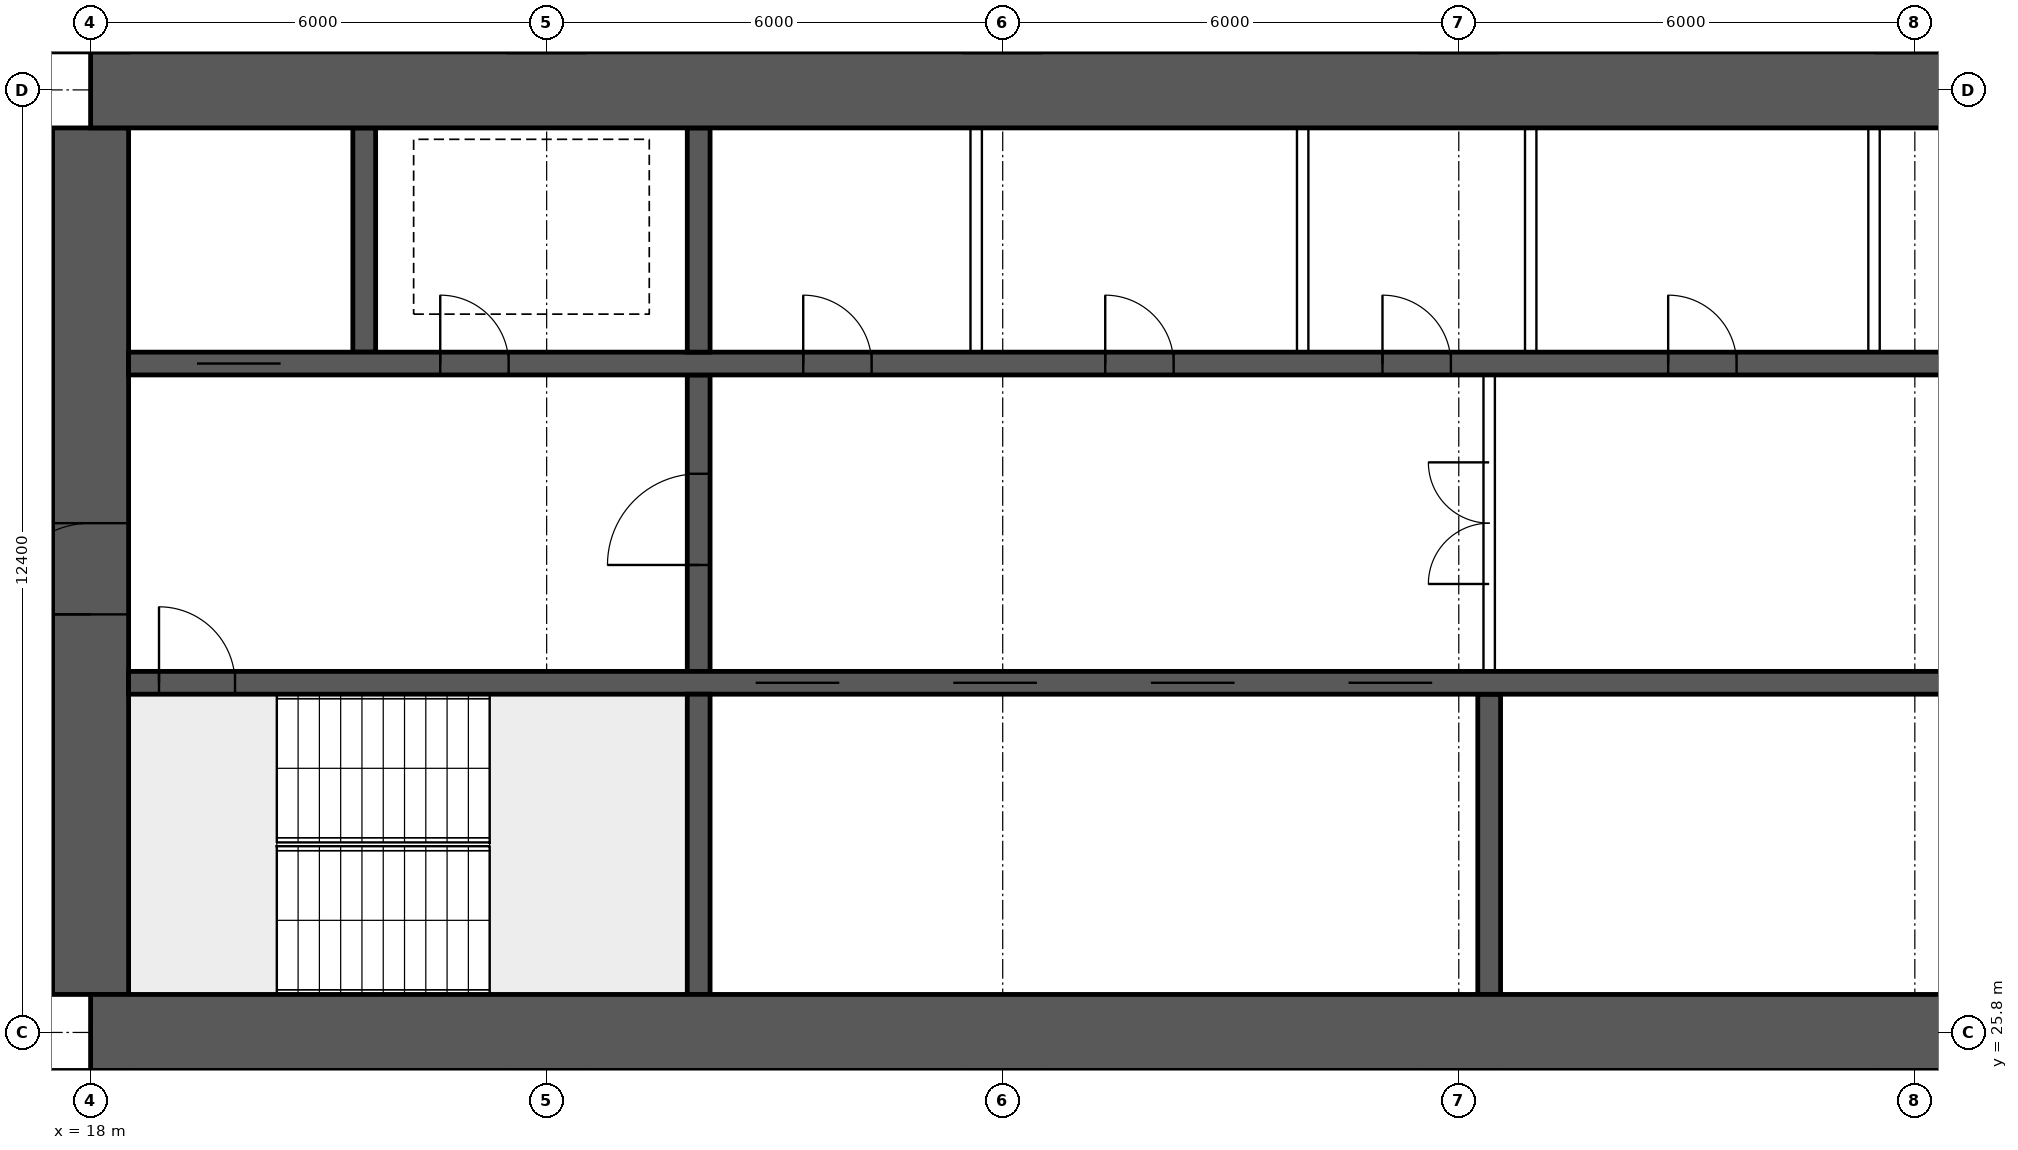
"""IFC4 building model, lengths in metres.
Left out: names, types, materials, properties, quantities, classifications, styles, units other than length and angle.
Written with IfcOpenShell. Run it as: python <this file> out.ifc"""

import sys

from ifc_helpers import new_model, si_unit, direction, frame, frame_2d, origin, place, context, subcontext, project, spatial, rectangle, extrude, element, fill, save


model = new_model("IFC4")
c1 = context("Model", 3, precision=1e-05, world=origin(), true_north=direction((0.0, 1.0)))
c2 = subcontext(c1, "Body", "Model", "MODEL_VIEW")
j1 = project(units=[si_unit("LENGTHUNIT", "METRE"), si_unit("PLANEANGLEUNIT", "RADIAN")], contexts=[c1])
p1 = place(None, origin())
s1 = spatial("IfcSite", under=j1, at=p1, CompositionType="ELEMENT")
p2 = place(p1, origin())
s2 = spatial("IfcBuilding", under=s1, at=p2, CompositionType="ELEMENT")
p3 = place(p2, frame((0.0, 0.0, 46.45)))
s3 = spatial("IfcBuildingStorey", under=s2, at=p3, CompositionType="ELEMENT", Elevation=46.45)
for number, where, z_axis, x_axis in (
    (1, (18.0, 25.8, 0.0), (0.0, 0.0, 1.0), (1.0, 0.0, 0.0)),
    (2, (18.0, 38.2, 0.0), (0.0, 0.0, 1.0), (1.0, 0.0, 0.0)),
):
    element("IfcWall", number, at=place(p3, frame(where, z_axis=z_axis, x_axis=x_axis)), inside=s3, PredefinedType="SHEAR", context=c2, shape_type="SweptSolid", body=[
        extrude(rectangle(XDim=48.0, YDim=1.0, at=frame_2d((24.0, 0.0))), origin(), (0.0, 0.0, 1.0), 3.75),
    ])
p4 = place(p3, frame((18.0, 26.3, 0.0), z_axis=(0.0, 0.0, 1.0), x_axis=(0.0, 1.0, 0.0)))
e3 = element("IfcWall", 3, at=p4, inside=s3, PredefinedType="SHEAR", context=c2, shape_type="SweptSolid", body=[
    extrude(rectangle(XDim=11.4, YDim=1.0, at=frame_2d((5.7, 0.0))), origin(), (0.0, 0.0, 1.0), 3.75),
])
p5 = place(p4, frame((5.0, 0.0, 0.0)))
e4 = element("IfcOpeningElement", 4, at=p5, cuts=e3, PredefinedType="OPENING", context=c2, shape_type="SweptSolid", body=[
    extrude(rectangle(XDim=1.2, YDim=2.1, at=frame_2d((0.6, 1.05))), frame((0.0, 0.51, 0.0), z_axis=(0.0, -1.0, 0.0), x_axis=(1.0, 0.0, 0.0)), (0.0, 0.0, 1.0), 1.02),
])
p6 = place(p3, frame((18.5, 30.4, 0.0), z_axis=(0.0, 0.0, 1.0), x_axis=(1.0, 0.0, 0.0)))
e5 = element("IfcWall", 5, at=p6, inside=s3, PredefinedType="SHEAR", context=c2, shape_type="SweptSolid", body=[
    extrude(rectangle(XDim=47.0, YDim=0.3, at=frame_2d((23.5, 0.0))), origin(), (0.0, 0.0, 1.0), 3.75),
])
p7 = place(p6, frame((0.4, 0.0, 0.0)))
e6 = element("IfcOpeningElement", 6, at=p7, cuts=e5, PredefinedType="OPENING", context=c2, shape_type="SweptSolid", body=[
    extrude(rectangle(XDim=1.0, YDim=2.1, at=frame_2d((0.5, 1.05))), frame((0.0, 0.16, 0.0), z_axis=(0.0, -1.0, 0.0), x_axis=(1.0, 0.0, 0.0)), (0.0, 0.0, 1.0), 0.32),
])
p8 = place(p6, frame((45.6, 0.0, 0.0)))
e7 = element("IfcOpeningElement", 7, at=p8, cuts=e5, PredefinedType="OPENING", context=c2, shape_type="SweptSolid", body=[
    extrude(rectangle(XDim=1.0, YDim=2.1, at=frame_2d((0.5, 1.05))), frame((0.0, 0.16, 0.0), z_axis=(0.0, -1.0, 0.0), x_axis=(1.0, 0.0, 0.0)), (0.0, 0.0, 1.0), 0.32),
])
p9 = place(p6, frame((8.25, 0.0, 0.0)))
e8 = element("IfcOpeningElement", 8, at=p9, cuts=e5, PredefinedType="OPENING", context=c2, shape_type="SweptSolid", body=[
    extrude(rectangle(XDim=1.1, YDim=2.1, at=frame_2d((0.55, 1.05))), frame((0.0, 0.16, 0.0), z_axis=(0.0, -1.0, 0.0), x_axis=(1.0, 0.0, 0.0)), (0.0, 0.0, 1.0), 0.32),
])
p10 = place(p6, frame((10.85, 0.0, 0.0)))
e9 = element("IfcOpeningElement", 9, at=p10, cuts=e5, PredefinedType="OPENING", context=c2, shape_type="SweptSolid", body=[
    extrude(rectangle(XDim=1.1, YDim=2.1, at=frame_2d((0.55, 1.05))), frame((0.0, 0.16, 0.0), z_axis=(0.0, -1.0, 0.0), x_axis=(1.0, 0.0, 0.0)), (0.0, 0.0, 1.0), 0.32),
])
p11 = place(p6, frame((13.45, 0.0, 0.0)))
e10 = element("IfcOpeningElement", 10, at=p11, cuts=e5, PredefinedType="OPENING", context=c2, shape_type="SweptSolid", body=[
    extrude(rectangle(XDim=1.1, YDim=2.1, at=frame_2d((0.55, 1.05))), frame((0.0, 0.16, 0.0), z_axis=(0.0, -1.0, 0.0), x_axis=(1.0, 0.0, 0.0)), (0.0, 0.0, 1.0), 0.32),
])
p12 = place(p6, frame((16.05, 0.0, 0.0)))
e11 = element("IfcOpeningElement", 11, at=p12, cuts=e5, PredefinedType="OPENING", context=c2, shape_type="SweptSolid", body=[
    extrude(rectangle(XDim=1.1, YDim=2.1, at=frame_2d((0.55, 1.05))), frame((0.0, 0.16, 0.0), z_axis=(0.0, -1.0, 0.0), x_axis=(1.0, 0.0, 0.0)), (0.0, 0.0, 1.0), 0.32),
])
p13 = place(p6, frame((30.117, 0.0, 0.0)))
e12 = element("IfcOpeningElement", 12, at=p13, cuts=e5, PredefinedType="OPENING", context=c2, shape_type="SweptSolid", body=[
    extrude(rectangle(XDim=1.1, YDim=2.1, at=frame_2d((0.55, 1.05))), frame((0.0, 0.16, 0.0), z_axis=(0.0, -1.0, 0.0), x_axis=(1.0, 0.0, 0.0)), (0.0, 0.0, 1.0), 0.32),
])
p14 = place(p6, frame((33.65, 0.0, 0.0)))
e13 = element("IfcOpeningElement", 13, at=p14, cuts=e5, PredefinedType="OPENING", context=c2, shape_type="SweptSolid", body=[
    extrude(rectangle(XDim=1.1, YDim=2.1, at=frame_2d((0.55, 1.05))), frame((0.0, 0.16, 0.0), z_axis=(0.0, -1.0, 0.0), x_axis=(1.0, 0.0, 0.0)), (0.0, 0.0, 1.0), 0.32),
])
p15 = place(p6, frame((37.183, 0.0, 0.0)))
e14 = element("IfcOpeningElement", 14, at=p15, cuts=e5, PredefinedType="OPENING", context=c2, shape_type="SweptSolid", body=[
    extrude(rectangle(XDim=1.1, YDim=2.1, at=frame_2d((0.55, 1.05))), frame((0.0, 0.16, 0.0), z_axis=(0.0, -1.0, 0.0), x_axis=(1.0, 0.0, 0.0)), (0.0, 0.0, 1.0), 0.32),
])
p16 = place(p3, frame((18.5, 34.6, 0.0), z_axis=(0.0, 0.0, 1.0), x_axis=(1.0, 0.0, 0.0)))
e15 = element("IfcWall", 15, at=p16, inside=s3, PredefinedType="SHEAR", context=c2, shape_type="SweptSolid", body=[
    extrude(rectangle(XDim=47.0, YDim=0.3, at=frame_2d((23.5, 0.0))), origin(), (0.0, 0.0, 1.0), 3.75),
])
p17 = place(p16, frame((0.9, 0.0, 0.0)))
e16 = element("IfcOpeningElement", 16, at=p17, cuts=e15, PredefinedType="OPENING", context=c2, shape_type="SweptSolid", body=[
    extrude(rectangle(XDim=1.1, YDim=2.1, at=frame_2d((0.55, 1.05))), frame((0.0, 0.16, 0.0), z_axis=(0.0, -1.0, 0.0), x_axis=(1.0, 0.0, 0.0)), (0.0, 0.0, 1.0), 0.32),
])
p18 = place(p16, frame((45.0, 0.0, 0.0)))
e17 = element("IfcOpeningElement", 17, at=p18, cuts=e15, PredefinedType="OPENING", context=c2, shape_type="SweptSolid", body=[
    extrude(rectangle(XDim=1.1, YDim=2.1, at=frame_2d((0.55, 1.05))), frame((0.0, 0.16, 0.0), z_axis=(0.0, -1.0, 0.0), x_axis=(1.0, 0.0, 0.0)), (0.0, 0.0, 1.0), 0.32),
])
p19 = place(p16, frame((4.1, 0.0, 0.0)))
e18 = element("IfcOpeningElement", 18, at=p19, cuts=e15, PredefinedType="OPENING", context=c2, shape_type="SweptSolid", body=[
    extrude(rectangle(XDim=0.9, YDim=2.1, at=frame_2d((0.45, 1.05))), frame((0.0, 0.16, 0.0), z_axis=(0.0, -1.0, 0.0), x_axis=(1.0, 0.0, 0.0)), (0.0, 0.0, 1.0), 0.32),
])
p20 = place(p16, frame((42.0, 0.0, 0.0)))
e19 = element("IfcOpeningElement", 19, at=p20, cuts=e15, PredefinedType="OPENING", context=c2, shape_type="SweptSolid", body=[
    extrude(rectangle(XDim=0.9, YDim=2.1, at=frame_2d((0.45, 1.05))), frame((0.0, 0.16, 0.0), z_axis=(0.0, -1.0, 0.0), x_axis=(1.0, 0.0, 0.0)), (0.0, 0.0, 1.0), 0.32),
])
p21 = place(p16, frame((8.875, 0.0, 0.0)))
e20 = element("IfcOpeningElement", 20, at=p21, cuts=e15, PredefinedType="OPENING", context=c2, shape_type="SweptSolid", body=[
    extrude(rectangle(XDim=0.9, YDim=2.1, at=frame_2d((0.45, 1.05))), frame((0.0, 0.16, 0.0), z_axis=(0.0, -1.0, 0.0), x_axis=(1.0, 0.0, 0.0)), (0.0, 0.0, 1.0), 0.32),
])
p22 = place(p16, frame((12.849, 0.0, 0.0)))
e21 = element("IfcOpeningElement", 21, at=p22, cuts=e15, PredefinedType="OPENING", context=c2, shape_type="SweptSolid", body=[
    extrude(rectangle(XDim=0.9, YDim=2.1, at=frame_2d((0.45, 1.05))), frame((0.0, 0.16, 0.0), z_axis=(0.0, -1.0, 0.0), x_axis=(1.0, 0.0, 0.0)), (0.0, 0.0, 1.0), 0.32),
])
p23 = place(p16, frame((16.496, 0.0, 0.0)))
e22 = element("IfcOpeningElement", 22, at=p23, cuts=e15, PredefinedType="OPENING", context=c2, shape_type="SweptSolid", body=[
    extrude(rectangle(XDim=0.9, YDim=2.1, at=frame_2d((0.45, 1.05))), frame((0.0, 0.16, 0.0), z_axis=(0.0, -1.0, 0.0), x_axis=(1.0, 0.0, 0.0)), (0.0, 0.0, 1.0), 0.32),
])
p24 = place(p16, frame((20.255, 0.0, 0.0)))
e23 = element("IfcOpeningElement", 23, at=p24, cuts=e15, PredefinedType="OPENING", context=c2, shape_type="SweptSolid", body=[
    extrude(rectangle(XDim=0.9, YDim=2.1, at=frame_2d((0.45, 1.05))), frame((0.0, 0.16, 0.0), z_axis=(0.0, -1.0, 0.0), x_axis=(1.0, 0.0, 0.0)), (0.0, 0.0, 1.0), 0.32),
])
p25 = place(p16, frame((24.661, 0.0, 0.0)))
e24 = element("IfcOpeningElement", 24, at=p25, cuts=e15, PredefinedType="OPENING", context=c2, shape_type="SweptSolid", body=[
    extrude(rectangle(XDim=0.9, YDim=2.1, at=frame_2d((0.45, 1.05))), frame((0.0, 0.16, 0.0), z_axis=(0.0, -1.0, 0.0), x_axis=(1.0, 0.0, 0.0)), (0.0, 0.0, 1.0), 0.32),
])
p26 = place(p16, frame((27.458, 0.0, 0.0)))
e25 = element("IfcOpeningElement", 25, at=p26, cuts=e15, PredefinedType="OPENING", context=c2, shape_type="SweptSolid", body=[
    extrude(rectangle(XDim=0.9, YDim=2.1, at=frame_2d((0.45, 1.05))), frame((0.0, 0.16, 0.0), z_axis=(0.0, -1.0, 0.0), x_axis=(1.0, 0.0, 0.0)), (0.0, 0.0, 1.0), 0.32),
])
p27 = place(p16, frame((30.641, 0.0, 0.0)))
e26 = element("IfcOpeningElement", 26, at=p27, cuts=e15, PredefinedType="OPENING", context=c2, shape_type="SweptSolid", body=[
    extrude(rectangle(XDim=0.9, YDim=2.1, at=frame_2d((0.45, 1.05))), frame((0.0, 0.16, 0.0), z_axis=(0.0, -1.0, 0.0), x_axis=(1.0, 0.0, 0.0)), (0.0, 0.0, 1.0), 0.32),
])
p28 = place(p16, frame((34.592, 0.0, 0.0)))
e27 = element("IfcOpeningElement", 27, at=p28, cuts=e15, PredefinedType="OPENING", context=c2, shape_type="SweptSolid", body=[
    extrude(rectangle(XDim=0.9, YDim=2.1, at=frame_2d((0.45, 1.05))), frame((0.0, 0.16, 0.0), z_axis=(0.0, -1.0, 0.0), x_axis=(1.0, 0.0, 0.0)), (0.0, 0.0, 1.0), 0.32),
])
p29 = place(p16, frame((37.53, 0.0, 0.0)))
e28 = element("IfcOpeningElement", 28, at=p29, cuts=e15, PredefinedType="OPENING", context=c2, shape_type="SweptSolid", body=[
    extrude(rectangle(XDim=0.9, YDim=2.1, at=frame_2d((0.45, 1.05))), frame((0.0, 0.16, 0.0), z_axis=(0.0, -1.0, 0.0), x_axis=(1.0, 0.0, 0.0)), (0.0, 0.0, 1.0), 0.32),
])
p30 = place(p3, frame((26.0, 26.3, 0.0), z_axis=(0.0, 0.0, 1.0), x_axis=(0.0, 1.0, 0.0)))
e29 = element("IfcWall", 29, at=p30, inside=s3, PredefinedType="SHEAR", context=c2, shape_type="SweptSolid", body=[
    extrude(rectangle(XDim=3.95, YDim=0.3, at=frame_2d((1.975, 0.0))), origin(), (0.0, 0.0, 1.0), 3.75),
])
p31 = place(p3, frame((26.0, 30.55, 0.0), z_axis=(0.0, 0.0, 1.0), x_axis=(0.0, 1.0, 0.0)))
e30 = element("IfcWall", 30, at=p31, inside=s3, PredefinedType="SHEAR", context=c2, shape_type="SweptSolid", body=[
    extrude(rectangle(XDim=3.9, YDim=0.3, at=frame_2d((1.95, 0.0))), origin(), (0.0, 0.0, 1.0), 3.75),
])
p32 = place(p31, frame((1.4, 0.0, 0.0)))
e31 = element("IfcOpeningElement", 31, at=p32, cuts=e30, PredefinedType="OPENING", context=c2, shape_type="SweptSolid", body=[
    extrude(rectangle(XDim=1.2, YDim=2.1, at=frame_2d((0.6, 1.05))), frame((0.0, 0.16, 0.0), z_axis=(0.0, -1.0, 0.0), x_axis=(1.0, 0.0, 0.0)), (0.0, 0.0, 1.0), 0.32),
])
for number, where, z_axis, x_axis in (
    (32, (21.6, 34.75, 0.0), (0.0, 0.0, 1.0), (0.0, 1.0, 0.0)),
    (33, (26.0, 34.75, 0.0), (0.0, 0.0, 1.0), (0.0, 1.0, 0.0)),
):
    element("IfcWall", number, at=place(p3, frame(where, z_axis=z_axis, x_axis=x_axis)), inside=s3, PredefinedType="SHEAR", context=c2, shape_type="SweptSolid", body=[
        extrude(rectangle(XDim=2.95, YDim=0.3, at=frame_2d((1.475, 0.0))), origin(), (0.0, 0.0, 1.0), 3.75),
    ])
p33 = place(p3, frame((36.4, 26.3, 0.0), z_axis=(0.0, 0.0, 1.0), x_axis=(0.0, 1.0, 0.0)))
e34 = element("IfcWall", 34, at=p33, inside=s3, PredefinedType="SHEAR", context=c2, shape_type="SweptSolid", body=[
    extrude(rectangle(XDim=3.95, YDim=0.3, at=frame_2d((1.975, 0.0))), origin(), (0.0, 0.0, 1.0), 3.75),
])
p34 = place(p3, frame((36.4, 30.55, 0.0), z_axis=(0.0, 0.0, 1.0), x_axis=(0.0, 1.0, 0.0)))
e35 = element("IfcWall", 35, at=p34, inside=s3, PredefinedType="SOLIDWALL", context=c2, shape_type="SweptSolid", body=[
    extrude(rectangle(XDim=3.9, YDim=0.15, at=frame_2d((1.95, 0.0))), origin(), (0.0, 0.0, 1.0), 3.5),
])
p35 = place(p34, frame((1.15, 0.0, 0.0)))
e36 = element("IfcOpeningElement", 36, at=p35, cuts=e35, PredefinedType="OPENING", context=c2, shape_type="SweptSolid", body=[
    extrude(rectangle(XDim=1.6, YDim=2.1, at=frame_2d((0.8, 1.05))), frame((0.0, 0.085, 0.0), z_axis=(0.0, -1.0, 0.0), x_axis=(1.0, 0.0, 0.0)), (0.0, 0.0, 1.0), 0.17),
])
for number, where, z_axis, x_axis in (
    (37, (29.651, 34.75, 0.0), (0.0, 0.0, 1.0), (0.0, 1.0, 0.0)),
    (38, (33.946, 34.75, 0.0), (0.0, 0.0, 1.0), (0.0, 1.0, 0.0)),
    (39, (36.946, 34.75, 0.0), (0.0, 0.0, 1.0), (0.0, 1.0, 0.0)),
    (40, (41.463, 34.75, 0.0), (0.0, 0.0, 1.0), (0.0, 1.0, 0.0)),
):
    element("IfcWall", number, at=place(p3, frame(where, z_axis=z_axis, x_axis=x_axis)), inside=s3, PredefinedType="SOLIDWALL", context=c2, shape_type="SweptSolid", body=[
        extrude(rectangle(XDim=2.95, YDim=0.15, at=frame_2d((1.475, 0.0))), origin(), (0.0, 0.0, 1.0), 3.5),
    ])
for number, where, z_axis, x_axis in (
    (41, (26.815, 14.9, 0.0), (0.0, 0.0, 1.0), (0.0, 1.0, 0.0)),
    (42, (32.83, 14.9, 0.0), (0.0, 0.0, 1.0), (0.0, 1.0, 0.0)),
    (43, (39.31, 14.9, 0.0), (0.0, 0.0, 1.0), (0.0, 1.0, 0.0)),
):
    element("IfcWall", number, at=place(p3, frame(where, z_axis=z_axis, x_axis=x_axis)), inside=s3, PredefinedType="PARTITIONING", context=c2, shape_type="SweptSolid", body=[
        extrude(rectangle(XDim=10.4, YDim=0.15, at=frame_2d((5.2, 0.0))), origin(), (0.0, 0.0, 1.0), 3.5),
    ])
p36 = place(p35, origin())
e44 = element("IfcDoor", 44, at=p36, inside=s3, OperationType="DOUBLE_DOOR_SINGLE_SWING", PredefinedType="DOOR", context=c2, shape_type="SweptSolid", body=[
    extrude(rectangle(XDim=1.6, YDim=2.1, at=frame_2d((0.8, 1.05))), frame((0.0, 0.025, 0.0), z_axis=(0.0, -1.0, 0.0), x_axis=(1.0, 0.0, 0.0)), (0.0, 0.0, 1.0), 0.05),
])
fill(e36, e44)
p37 = place(p5, origin())
e45 = element("IfcDoor", 45, at=p37, inside=s3, OperationType="SINGLE_SWING_LEFT", PredefinedType="DOOR", context=c2, shape_type="SweptSolid", body=[
    extrude(rectangle(XDim=1.2, YDim=2.1, at=frame_2d((0.6, 1.05))), frame((0.0, 0.025, 0.0), z_axis=(0.0, -1.0, 0.0), x_axis=(1.0, 0.0, 0.0)), (0.0, 0.0, 1.0), 0.05),
])
fill(e4, e45)
p38 = place(p7, origin())
e46 = element("IfcDoor", 46, at=p38, inside=s3, OperationType="SINGLE_SWING_LEFT", PredefinedType="DOOR", context=c2, shape_type="SweptSolid", body=[
    extrude(rectangle(XDim=1.0, YDim=2.1, at=frame_2d((0.5, 1.05))), frame((0.0, 0.025, 0.0), z_axis=(0.0, -1.0, 0.0), x_axis=(1.0, 0.0, 0.0)), (0.0, 0.0, 1.0), 0.05),
])
fill(e6, e46)
p39 = place(p17, origin())
e47 = element("IfcDoor", 47, at=p39, inside=s3, OperationType="DOUBLE_DOOR_SLIDING", PredefinedType="DOOR", context=c2, shape_type="SweptSolid", body=[
    extrude(rectangle(XDim=1.1, YDim=2.1, at=frame_2d((0.55, 1.05))), frame((0.0, 0.025, 0.0), z_axis=(0.0, -1.0, 0.0), x_axis=(1.0, 0.0, 0.0)), (0.0, 0.0, 1.0), 0.05),
])
fill(e16, e47)
p40 = place(p19, origin())
e48 = element("IfcDoor", 48, at=p40, inside=s3, OperationType="SINGLE_SWING_LEFT", PredefinedType="DOOR", context=c2, shape_type="SweptSolid", body=[
    extrude(rectangle(XDim=0.9, YDim=2.1, at=frame_2d((0.45, 1.05))), frame((0.0, 0.025, 0.0), z_axis=(0.0, -1.0, 0.0), x_axis=(1.0, 0.0, 0.0)), (0.0, 0.0, 1.0), 0.05),
])
fill(e18, e48)
p41 = place(p32, origin())
e49 = element("IfcDoor", 49, at=p41, inside=s3, OperationType="SINGLE_SWING_LEFT", PredefinedType="DOOR", context=c2, shape_type="SweptSolid", body=[
    extrude(rectangle(XDim=1.2, YDim=2.1, at=frame_2d((0.6, 1.05))), frame((0.0, 0.025, 0.0), z_axis=(0.0, -1.0, 0.0), x_axis=(1.0, 0.0, 0.0)), (0.0, 0.0, 1.0), 0.05),
])
fill(e31, e49)
p42 = place(p21, origin())
e50 = element("IfcDoor", 50, at=p42, inside=s3, OperationType="SINGLE_SWING_LEFT", PredefinedType="DOOR", context=c2, shape_type="SweptSolid", body=[
    extrude(rectangle(XDim=0.9, YDim=2.1, at=frame_2d((0.45, 1.05))), frame((0.0, 0.025, 0.0), z_axis=(0.0, -1.0, 0.0), x_axis=(1.0, 0.0, 0.0)), (0.0, 0.0, 1.0), 0.05),
])
fill(e20, e50)
p43 = place(p22, origin())
e51 = element("IfcDoor", 51, at=p43, inside=s3, OperationType="SINGLE_SWING_LEFT", PredefinedType="DOOR", context=c2, shape_type="SweptSolid", body=[
    extrude(rectangle(XDim=0.9, YDim=2.1, at=frame_2d((0.45, 1.05))), frame((0.0, 0.025, 0.0), z_axis=(0.0, -1.0, 0.0), x_axis=(1.0, 0.0, 0.0)), (0.0, 0.0, 1.0), 0.05),
])
fill(e21, e51)
p44 = place(p23, origin())
e52 = element("IfcDoor", 52, at=p44, inside=s3, OperationType="SINGLE_SWING_LEFT", PredefinedType="DOOR", context=c2, shape_type="SweptSolid", body=[
    extrude(rectangle(XDim=0.9, YDim=2.1, at=frame_2d((0.45, 1.05))), frame((0.0, 0.025, 0.0), z_axis=(0.0, -1.0, 0.0), x_axis=(1.0, 0.0, 0.0)), (0.0, 0.0, 1.0), 0.05),
])
fill(e22, e52)
p45 = place(p24, origin())
e53 = element("IfcDoor", 53, at=p45, inside=s3, OperationType="SINGLE_SWING_LEFT", PredefinedType="DOOR", context=c2, shape_type="SweptSolid", body=[
    extrude(rectangle(XDim=0.9, YDim=2.1, at=frame_2d((0.45, 1.05))), frame((0.0, 0.025, 0.0), z_axis=(0.0, -1.0, 0.0), x_axis=(1.0, 0.0, 0.0)), (0.0, 0.0, 1.0), 0.05),
])
fill(e23, e53)
p46 = place(p9, origin())
e54 = element("IfcDoor", 54, at=p46, inside=s3, OperationType="DOUBLE_DOOR_SLIDING", PredefinedType="DOOR", context=c2, shape_type="SweptSolid", body=[
    extrude(rectangle(XDim=1.1, YDim=2.1, at=frame_2d((0.55, 1.05))), frame((0.0, 0.025, 0.0), z_axis=(0.0, -1.0, 0.0), x_axis=(1.0, 0.0, 0.0)), (0.0, 0.0, 1.0), 0.05),
])
fill(e8, e54)
p47 = place(p10, origin())
e55 = element("IfcDoor", 55, at=p47, inside=s3, OperationType="DOUBLE_DOOR_SLIDING", PredefinedType="DOOR", context=c2, shape_type="SweptSolid", body=[
    extrude(rectangle(XDim=1.1, YDim=2.1, at=frame_2d((0.55, 1.05))), frame((0.0, 0.025, 0.0), z_axis=(0.0, -1.0, 0.0), x_axis=(1.0, 0.0, 0.0)), (0.0, 0.0, 1.0), 0.05),
])
fill(e9, e55)
p48 = place(p11, origin())
e56 = element("IfcDoor", 56, at=p48, inside=s3, OperationType="DOUBLE_DOOR_SLIDING", PredefinedType="DOOR", context=c2, shape_type="SweptSolid", body=[
    extrude(rectangle(XDim=1.1, YDim=2.1, at=frame_2d((0.55, 1.05))), frame((0.0, 0.025, 0.0), z_axis=(0.0, -1.0, 0.0), x_axis=(1.0, 0.0, 0.0)), (0.0, 0.0, 1.0), 0.05),
])
fill(e10, e56)
p49 = place(p12, origin())
e57 = element("IfcDoor", 57, at=p49, inside=s3, OperationType="DOUBLE_DOOR_SLIDING", PredefinedType="DOOR", context=c2, shape_type="SweptSolid", body=[
    extrude(rectangle(XDim=1.1, YDim=2.1, at=frame_2d((0.55, 1.05))), frame((0.0, 0.025, 0.0), z_axis=(0.0, -1.0, 0.0), x_axis=(1.0, 0.0, 0.0)), (0.0, 0.0, 1.0), 0.05),
])
fill(e11, e57)
save(model, sys.argv[1])
